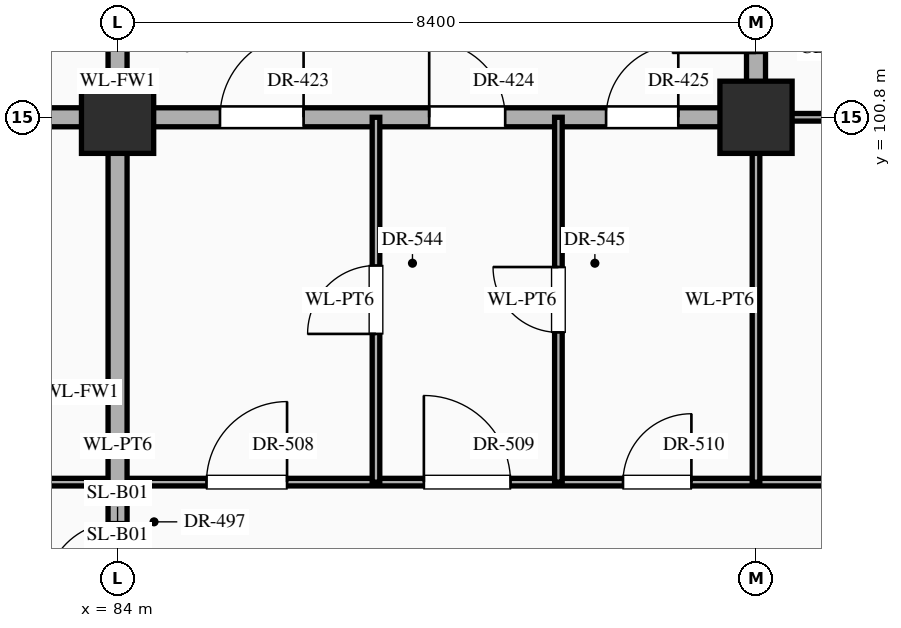
"""IFC4 building model, lengths in metres.
Left out: names, types, materials, properties, quantities, classifications, styles, units other than length and angle.
Written with IfcOpenShell. Run it as: python <this file> out.ifc"""

import sys

from ifc_helpers import new_model, si_unit, direction, frame, frame_2d, origin, origin_2d, place, context, subcontext, project, spatial, rectangle, extrude, element, fill, save


model = new_model("IFC4")
c1 = context("Model", 3, precision=1e-05, world=origin(), true_north=direction((0.0, 1.0)))
c2 = subcontext(c1, "Body", "Model", "MODEL_VIEW")
j1 = project(units=[si_unit("LENGTHUNIT", "METRE"), si_unit("PLANEANGLEUNIT", "RADIAN")], contexts=[c1])
p1 = place(None, origin())
s1 = spatial("IfcSite", under=j1, at=p1, CompositionType="ELEMENT")
p2 = place(p1, origin())
s2 = spatial("IfcBuilding", under=s1, at=p2, CompositionType="ELEMENT")
p3 = place(p2, frame((0.0, 0.0, -5.4)))
s3 = spatial("IfcBuildingStorey", under=s2, at=p3, CompositionType="ELEMENT", Elevation=-5.4)
for number, where, z_axis, x_axis in (
    (1, (84.0, 100.8, 0.0), (0.0, 0.0, 1.0), (1.0, 0.0, 0.0)),
    (2, (92.4, 100.8, 0.0), (0.0, 0.0, 1.0), (1.0, 0.0, 0.0)),
):
    element("IfcColumn", number, at=place(p3, frame(where, z_axis=z_axis, x_axis=x_axis)), inside=s3, PredefinedType="COLUMN", context=c2, shape_type="SweptSolid", body=[
        extrude(rectangle(XDim=0.95, YDim=0.95, at=origin_2d()), origin(), (0.0, 0.0, 1.0), 5.4),
    ])
p4 = place(p3, frame((16.8, 96.0, 0.0), z_axis=(0.0, 0.0, 1.0), x_axis=(1.0, 0.0, 0.0)))
e3 = element("IfcWall", 3, at=p4, inside=s3, PredefinedType="STANDARD", context=c2, shape_type="SweptSolid", body=[
    extrude(rectangle(XDim=134.4, YDim=0.1, at=frame_2d((67.2, 0.0))), origin(), (0.0, 0.0, 1.0), 5.1),
])
p5 = place(p4, frame((3.56, 0.0, 0.0)))
e4 = element("IfcOpeningElement", 4, at=p5, cuts=e3, PredefinedType="OPENING", context=c2, shape_type="SweptSolid", body=[
    extrude(rectangle(XDim=1.28, YDim=2.35, at=frame_2d((0.64, 1.175))), frame((0.0, 0.062, 0.0), z_axis=(0.0, -1.0, 0.0), x_axis=(1.0, 0.0, 0.0)), (0.0, 0.0, 1.0), 0.124),
])
p6 = place(p4, frame((9.63, 0.0, 0.0)))
e5 = element("IfcOpeningElement", 5, at=p6, cuts=e3, PredefinedType="OPENING", context=c2, shape_type="SweptSolid", body=[
    extrude(rectangle(XDim=0.94, YDim=2.3, at=frame_2d((0.47, 1.15))), frame((0.0, 0.062, 0.0), z_axis=(0.0, -1.0, 0.0), x_axis=(1.0, 0.0, 0.0)), (0.0, 0.0, 1.0), 0.124),
])
p7 = place(p4, frame((12.51, 0.0, 0.0)))
e6 = element("IfcOpeningElement", 6, at=p7, cuts=e3, PredefinedType="OPENING", context=c2, shape_type="SweptSolid", body=[
    extrude(rectangle(XDim=0.98, YDim=2.35, at=frame_2d((0.49, 1.175))), frame((0.0, 0.062, 0.0), z_axis=(0.0, -1.0, 0.0), x_axis=(1.0, 0.0, 0.0)), (0.0, 0.0, 1.0), 0.124),
])
p8 = place(p4, frame((14.99, 0.0, 0.0)))
e7 = element("IfcOpeningElement", 7, at=p8, cuts=e3, PredefinedType="OPENING", context=c2, shape_type="SweptSolid", body=[
    extrude(rectangle(XDim=1.02, YDim=2.4, at=frame_2d((0.51, 1.2))), frame((0.0, 0.062, 0.0), z_axis=(0.0, -1.0, 0.0), x_axis=(1.0, 0.0, 0.0)), (0.0, 0.0, 1.0), 0.124),
])
p9 = place(p4, frame((20.47, 0.0, 0.0)))
e8 = element("IfcOpeningElement", 8, at=p9, cuts=e3, PredefinedType="OPENING", context=c2, shape_type="SweptSolid", body=[
    extrude(rectangle(XDim=1.06, YDim=2.4, at=frame_2d((0.53, 1.2))), frame((0.0, 0.062, 0.0), z_axis=(0.0, -1.0, 0.0), x_axis=(1.0, 0.0, 0.0)), (0.0, 0.0, 1.0), 0.124),
])
p10 = place(p4, frame((28.83, 0.0, 0.0)))
e9 = element("IfcOpeningElement", 9, at=p10, cuts=e3, PredefinedType="OPENING", context=c2, shape_type="SweptSolid", body=[
    extrude(rectangle(XDim=1.14, YDim=2.4, at=frame_2d((0.57, 1.2))), frame((0.0, 0.062, 0.0), z_axis=(0.0, -1.0, 0.0), x_axis=(1.0, 0.0, 0.0)), (0.0, 0.0, 1.0), 0.124),
])
p11 = place(p4, frame((34.78, 0.0, 0.0)))
e10 = element("IfcOpeningElement", 10, at=p11, cuts=e3, PredefinedType="OPENING", context=c2, shape_type="SweptSolid", body=[
    extrude(rectangle(XDim=1.04, YDim=2.2, at=frame_2d((0.52, 1.1))), frame((0.0, 0.062, 0.0), z_axis=(0.0, -1.0, 0.0), x_axis=(1.0, 0.0, 0.0)), (0.0, 0.0, 1.0), 0.124),
])
p12 = place(p4, frame((37.66, 0.0, 0.0)))
e11 = element("IfcOpeningElement", 11, at=p12, cuts=e3, PredefinedType="OPENING", context=c2, shape_type="SweptSolid", body=[
    extrude(rectangle(XDim=1.08, YDim=2.25, at=frame_2d((0.54, 1.125))), frame((0.0, 0.062, 0.0), z_axis=(0.0, -1.0, 0.0), x_axis=(1.0, 0.0, 0.0)), (0.0, 0.0, 1.0), 0.124),
])
p13 = place(p4, frame((40.14, 0.0, 0.0)))
e12 = element("IfcOpeningElement", 12, at=p13, cuts=e3, PredefinedType="OPENING", context=c2, shape_type="SweptSolid", body=[
    extrude(rectangle(XDim=1.12, YDim=2.25, at=frame_2d((0.56, 1.125))), frame((0.0, 0.062, 0.0), z_axis=(0.0, -1.0, 0.0), x_axis=(1.0, 0.0, 0.0)), (0.0, 0.0, 1.0), 0.124),
])
p14 = place(p4, frame((45.62, 0.0, 0.0)))
e13 = element("IfcOpeningElement", 13, at=p14, cuts=e3, PredefinedType="OPENING", context=c2, shape_type="SweptSolid", body=[
    extrude(rectangle(XDim=1.16, YDim=2.3, at=frame_2d((0.58, 1.15))), frame((0.0, 0.062, 0.0), z_axis=(0.0, -1.0, 0.0), x_axis=(1.0, 0.0, 0.0)), (0.0, 0.0, 1.0), 0.124),
])
p15 = place(p4, frame((54.0, 0.0, 0.0)))
e14 = element("IfcOpeningElement", 14, at=p15, cuts=e3, PredefinedType="OPENING", context=c2, shape_type="SweptSolid", body=[
    extrude(rectangle(XDim=1.2, YDim=2.35, at=frame_2d((0.6, 1.175))), frame((0.0, 0.062, 0.0), z_axis=(0.0, -1.0, 0.0), x_axis=(1.0, 0.0, 0.0)), (0.0, 0.0, 1.0), 0.124),
])
p16 = place(p4, frame((62.38, 0.0, 0.0)))
e15 = element("IfcOpeningElement", 15, at=p16, cuts=e3, PredefinedType="OPENING", context=c2, shape_type="SweptSolid", body=[
    extrude(rectangle(XDim=1.24, YDim=2.3, at=frame_2d((0.62, 1.15))), frame((0.0, 0.062, 0.0), z_axis=(0.0, -1.0, 0.0), x_axis=(1.0, 0.0, 0.0)), (0.0, 0.0, 1.0), 0.124),
])
p17 = place(p4, frame((68.37, 0.0, 0.0)))
e16 = element("IfcOpeningElement", 16, at=p17, cuts=e3, PredefinedType="OPENING", context=c2, shape_type="SweptSolid", body=[
    extrude(rectangle(XDim=1.06, YDim=2.4, at=frame_2d((0.53, 1.2))), frame((0.0, 0.062, 0.0), z_axis=(0.0, -1.0, 0.0), x_axis=(1.0, 0.0, 0.0)), (0.0, 0.0, 1.0), 0.124),
])
p18 = place(p4, frame((71.23, 0.0, 0.0)))
e17 = element("IfcOpeningElement", 17, at=p18, cuts=e3, PredefinedType="OPENING", context=c2, shape_type="SweptSolid", body=[
    extrude(rectangle(XDim=1.14, YDim=2.4, at=frame_2d((0.57, 1.2))), frame((0.0, 0.062, 0.0), z_axis=(0.0, -1.0, 0.0), x_axis=(1.0, 0.0, 0.0)), (0.0, 0.0, 1.0), 0.124),
])
p19 = place(p4, frame((73.85, 0.0, 0.0)))
e18 = element("IfcOpeningElement", 18, at=p19, cuts=e3, PredefinedType="OPENING", context=c2, shape_type="SweptSolid", body=[
    extrude(rectangle(XDim=0.9, YDim=2.15, at=frame_2d((0.45, 1.075))), frame((0.0, 0.062, 0.0), z_axis=(0.0, -1.0, 0.0), x_axis=(1.0, 0.0, 0.0)), (0.0, 0.0, 1.0), 0.124),
])
p20 = place(p4, frame((79.37, 0.0, 0.0)))
e19 = element("IfcOpeningElement", 19, at=p20, cuts=e3, PredefinedType="OPENING", context=c2, shape_type="SweptSolid", body=[
    extrude(rectangle(XDim=0.86, YDim=2.1, at=frame_2d((0.43, 1.05))), frame((0.0, 0.062, 0.0), z_axis=(0.0, -1.0, 0.0), x_axis=(1.0, 0.0, 0.0)), (0.0, 0.0, 1.0), 0.124),
])
p21 = place(p4, frame((87.74, 0.0, 0.0)))
e20 = element("IfcOpeningElement", 20, at=p21, cuts=e3, PredefinedType="OPENING", context=c2, shape_type="SweptSolid", body=[
    extrude(rectangle(XDim=0.92, YDim=2.15, at=frame_2d((0.46, 1.075))), frame((0.0, 0.062, 0.0), z_axis=(0.0, -1.0, 0.0), x_axis=(1.0, 0.0, 0.0)), (0.0, 0.0, 1.0), 0.124),
])
p22 = place(p4, frame((93.62, 0.0, 0.0)))
e21 = element("IfcOpeningElement", 21, at=p22, cuts=e3, PredefinedType="OPENING", context=c2, shape_type="SweptSolid", body=[
    extrude(rectangle(XDim=0.96, YDim=2.2, at=frame_2d((0.48, 1.1))), frame((0.0, 0.062, 0.0), z_axis=(0.0, -1.0, 0.0), x_axis=(1.0, 0.0, 0.0)), (0.0, 0.0, 1.0), 0.124),
])
p23 = place(p4, frame((96.5, 0.0, 0.0)))
e22 = element("IfcOpeningElement", 22, at=p23, cuts=e3, PredefinedType="OPENING", context=c2, shape_type="SweptSolid", body=[
    extrude(rectangle(XDim=1.0, YDim=2.25, at=frame_2d((0.5, 1.125))), frame((0.0, 0.062, 0.0), z_axis=(0.0, -1.0, 0.0), x_axis=(1.0, 0.0, 0.0)), (0.0, 0.0, 1.0), 0.124),
])
p24 = place(p4, frame((98.98, 0.0, 0.0)))
e23 = element("IfcOpeningElement", 23, at=p24, cuts=e3, PredefinedType="OPENING", context=c2, shape_type="SweptSolid", body=[
    extrude(rectangle(XDim=1.04, YDim=2.2, at=frame_2d((0.52, 1.1))), frame((0.0, 0.062, 0.0), z_axis=(0.0, -1.0, 0.0), x_axis=(1.0, 0.0, 0.0)), (0.0, 0.0, 1.0), 0.124),
])
p25 = place(p4, frame((104.53, 0.0, 0.0)))
e24 = element("IfcOpeningElement", 24, at=p25, cuts=e3, PredefinedType="OPENING", context=c2, shape_type="SweptSolid", body=[
    extrude(rectangle(XDim=0.94, YDim=2.3, at=frame_2d((0.47, 1.15))), frame((0.0, 0.062, 0.0), z_axis=(0.0, -1.0, 0.0), x_axis=(1.0, 0.0, 0.0)), (0.0, 0.0, 1.0), 0.124),
])
p26 = place(p4, frame((112.91, 0.0, 0.0)))
e25 = element("IfcOpeningElement", 25, at=p26, cuts=e3, PredefinedType="OPENING", context=c2, shape_type="SweptSolid", body=[
    extrude(rectangle(XDim=0.98, YDim=2.35, at=frame_2d((0.49, 1.175))), frame((0.0, 0.062, 0.0), z_axis=(0.0, -1.0, 0.0), x_axis=(1.0, 0.0, 0.0)), (0.0, 0.0, 1.0), 0.124),
])
p27 = place(p4, frame((118.79, 0.0, 0.0)))
e26 = element("IfcOpeningElement", 26, at=p27, cuts=e3, PredefinedType="OPENING", context=c2, shape_type="SweptSolid", body=[
    extrude(rectangle(XDim=1.02, YDim=2.4, at=frame_2d((0.51, 1.2))), frame((0.0, 0.062, 0.0), z_axis=(0.0, -1.0, 0.0), x_axis=(1.0, 0.0, 0.0)), (0.0, 0.0, 1.0), 0.124),
])
p28 = place(p4, frame((121.67, 0.0, 0.0)))
e27 = element("IfcOpeningElement", 27, at=p28, cuts=e3, PredefinedType="OPENING", context=c2, shape_type="SweptSolid", body=[
    extrude(rectangle(XDim=1.06, YDim=2.4, at=frame_2d((0.53, 1.2))), frame((0.0, 0.062, 0.0), z_axis=(0.0, -1.0, 0.0), x_axis=(1.0, 0.0, 0.0)), (0.0, 0.0, 1.0), 0.124),
])
p29 = place(p4, frame((124.13, 0.0, 0.0)))
e28 = element("IfcOpeningElement", 28, at=p29, cuts=e3, PredefinedType="OPENING", context=c2, shape_type="SweptSolid", body=[
    extrude(rectangle(XDim=1.14, YDim=2.4, at=frame_2d((0.57, 1.2))), frame((0.0, 0.062, 0.0), z_axis=(0.0, -1.0, 0.0), x_axis=(1.0, 0.0, 0.0)), (0.0, 0.0, 1.0), 0.124),
])
p30 = place(p4, frame((129.75, 0.0, 0.0)))
e29 = element("IfcOpeningElement", 29, at=p30, cuts=e3, PredefinedType="OPENING", context=c2, shape_type="SweptSolid", body=[
    extrude(rectangle(XDim=0.9, YDim=2.15, at=frame_2d((0.45, 1.075))), frame((0.0, 0.062, 0.0), z_axis=(0.0, -1.0, 0.0), x_axis=(1.0, 0.0, 0.0)), (0.0, 0.0, 1.0), 0.124),
])
p31 = place(p3, frame((75.6, 100.8, 0.0), z_axis=(0.0, 0.0, 1.0), x_axis=(1.0, 0.0, 0.0)))
e30 = element("IfcWall", 30, at=p31, inside=s3, PredefinedType="STANDARD", context=c2, shape_type="SweptSolid", body=[
    extrude(rectangle(XDim=16.8, YDim=0.25, at=frame_2d((8.4, 0.0))), origin(), (0.0, 0.0, 1.0), 4.25),
])
p32 = place(p31, frame((3.7, 0.0, 0.0)))
e31 = element("IfcOpeningElement", 31, at=p32, cuts=e30, PredefinedType="OPENING", context=c2, shape_type="SweptSolid", body=[
    extrude(rectangle(XDim=1.0, YDim=2.2, at=frame_2d((0.5, 1.1))), frame((0.0, 0.137, 0.0), z_axis=(0.0, -1.0, 0.0), x_axis=(1.0, 0.0, 0.0)), (0.0, 0.0, 1.0), 0.274),
])
p33 = place(p31, frame((9.748, 0.0, 0.0)))
e32 = element("IfcOpeningElement", 32, at=p33, cuts=e30, PredefinedType="OPENING", context=c2, shape_type="SweptSolid", body=[
    extrude(rectangle(XDim=1.1, YDim=2.2, at=frame_2d((0.55, 1.1))), frame((0.0, 0.137, 0.0), z_axis=(0.0, -1.0, 0.0), x_axis=(1.0, 0.0, 0.0)), (0.0, 0.0, 1.0), 0.274),
])
p34 = place(p31, frame((12.5, 0.0, 0.0)))
e33 = element("IfcOpeningElement", 33, at=p34, cuts=e30, PredefinedType="OPENING", context=c2, shape_type="SweptSolid", body=[
    extrude(rectangle(XDim=1.0, YDim=2.2, at=frame_2d((0.5, 1.1))), frame((0.0, 0.137, 0.0), z_axis=(0.0, -1.0, 0.0), x_axis=(1.0, 0.0, 0.0)), (0.0, 0.0, 1.0), 0.274),
])
p35 = place(p31, frame((14.827, 0.0, 0.0)))
e34 = element("IfcOpeningElement", 34, at=p35, cuts=e30, PredefinedType="OPENING", context=c2, shape_type="SweptSolid", body=[
    extrude(rectangle(XDim=0.95, YDim=2.15, at=frame_2d((0.475, 1.075))), frame((0.0, 0.137, 0.0), z_axis=(0.0, -1.0, 0.0), x_axis=(1.0, 0.0, 0.0)), (0.0, 0.0, 1.0), 0.274),
])
p36 = place(p3, frame((92.4, 100.8, 0.0), z_axis=(0.0, 0.0, 1.0), x_axis=(1.0, 0.0, 0.0)))
e35 = element("IfcWall", 35, at=p36, inside=s3, PredefinedType="STANDARD", context=c2, shape_type="SweptSolid", body=[
    extrude(rectangle(XDim=4.2, YDim=0.1, at=frame_2d((2.1, 0.0))), origin(), (0.0, 0.0, 1.0), 4.25),
])
p37 = place(p36, frame((1.768, 0.0, 0.0)))
e36 = element("IfcOpeningElement", 36, at=p37, cuts=e35, PredefinedType="OPENING", context=c2, shape_type="SweptSolid", body=[
    extrude(rectangle(XDim=1.06, YDim=2.4, at=frame_2d((0.53, 1.2))), frame((0.0, 0.062, 0.0), z_axis=(0.0, -1.0, 0.0), x_axis=(1.0, 0.0, 0.0)), (0.0, 0.0, 1.0), 0.124),
])
p38 = place(p3, frame((84.0, 79.2, 0.0), z_axis=(0.0, 0.0, 1.0), x_axis=(0.0, 1.0, 0.0)))
e37 = element("IfcWall", 37, at=p38, inside=s3, PredefinedType="STANDARD", context=c2, shape_type="SweptSolid", body=[
    extrude(rectangle(XDim=35.96, YDim=0.25, at=frame_2d((17.98, 0.0))), origin(), (0.0, 0.0, 1.0), 4.35),
])
p39 = place(p38, frame((22.798, 0.0, 0.0)))
e38 = element("IfcOpeningElement", 38, at=p39, cuts=e37, PredefinedType="OPENING", context=c2, shape_type="SweptSolid", body=[
    extrude(rectangle(XDim=1.6, YDim=2.3, at=frame_2d((0.8, 1.15))), frame((0.0, 0.137, 0.0), z_axis=(0.0, -1.0, 0.0), x_axis=(1.0, 0.0, 0.0)), (0.0, 0.0, 1.0), 0.274),
])
p40 = place(p38, frame((12.528, 0.0, 0.0)))
e39 = element("IfcOpeningElement", 39, at=p40, cuts=e37, PredefinedType="OPENING", context=c2, shape_type="SweptSolid", body=[
    extrude(rectangle(XDim=0.95, YDim=2.15, at=frame_2d((0.475, 1.075))), frame((0.0, 0.137, 0.0), z_axis=(0.0, -1.0, 0.0), x_axis=(1.0, 0.0, 0.0)), (0.0, 0.0, 1.0), 0.274),
])
p41 = place(p38, frame((15.323, 0.0, 0.0)))
e40 = element("IfcOpeningElement", 40, at=p41, cuts=e37, PredefinedType="OPENING", context=c2, shape_type="SweptSolid", body=[
    extrude(rectangle(XDim=0.95, YDim=2.15, at=frame_2d((0.475, 1.075))), frame((0.0, 0.137, 0.0), z_axis=(0.0, -1.0, 0.0), x_axis=(1.0, 0.0, 0.0)), (0.0, 0.0, 1.0), 0.274),
])
p42 = place(p38, frame((25.903, 0.0, 0.0)))
e41 = element("IfcOpeningElement", 41, at=p42, cuts=e37, PredefinedType="OPENING", context=c2, shape_type="SweptSolid", body=[
    extrude(rectangle(XDim=1.8, YDim=2.35, at=frame_2d((0.9, 1.175))), frame((0.0, 0.137, 0.0), z_axis=(0.0, -1.0, 0.0), x_axis=(1.0, 0.0, 0.0)), (0.0, 0.0, 1.0), 0.274),
])
p43 = place(p38, frame((29.722, 0.0, 0.0)))
e42 = element("IfcOpeningElement", 42, at=p43, cuts=e37, PredefinedType="OPENING", context=c2, shape_type="SweptSolid", body=[
    extrude(rectangle(XDim=0.95, YDim=2.15, at=frame_2d((0.475, 1.075))), frame((0.0, 0.137, 0.0), z_axis=(0.0, -1.0, 0.0), x_axis=(1.0, 0.0, 0.0)), (0.0, 0.0, 1.0), 0.274),
])
p44 = place(p38, frame((5.327, 0.0, 0.0)))
e43 = element("IfcOpeningElement", 43, at=p44, cuts=e37, PredefinedType="OPENING", context=c2, shape_type="SweptSolid", body=[
    extrude(rectangle(XDim=0.95, YDim=2.15, at=frame_2d((0.475, 1.075))), frame((0.0, 0.137, 0.0), z_axis=(0.0, -1.0, 0.0), x_axis=(1.0, 0.0, 0.0)), (0.0, 0.0, 1.0), 0.274),
])
p45 = place(p3, frame((87.4, 96.0, 0.0), z_axis=(0.0, 0.0, 1.0), x_axis=(0.0, 1.0, 0.0)))
e44 = element("IfcWall", 44, at=p45, inside=s3, PredefinedType="STANDARD", context=c2, shape_type="SweptSolid", body=[
    extrude(rectangle(XDim=4.8, YDim=0.1, at=frame_2d((2.4, 0.0))), origin(), (0.0, 0.0, 1.0), 5.1),
])
p46 = place(p45, frame((1.95, 0.0, 0.0)))
e45 = element("IfcOpeningElement", 45, at=p46, cuts=e44, PredefinedType="OPENING", context=c2, shape_type="SweptSolid", body=[
    extrude(rectangle(XDim=0.9, YDim=2.15, at=frame_2d((0.45, 1.075))), frame((0.0, 0.062, 0.0), z_axis=(0.0, -1.0, 0.0), x_axis=(1.0, 0.0, 0.0)), (0.0, 0.0, 1.0), 0.124),
])
p47 = place(p3, frame((89.8, 96.0, 0.0), z_axis=(0.0, 0.0, 1.0), x_axis=(0.0, 1.0, 0.0)))
e46 = element("IfcWall", 46, at=p47, inside=s3, PredefinedType="STANDARD", context=c2, shape_type="SweptSolid", body=[
    extrude(rectangle(XDim=4.8, YDim=0.1, at=frame_2d((2.4, 0.0))), origin(), (0.0, 0.0, 1.0), 5.1),
])
p48 = place(p47, frame((1.97, 0.0, 0.0)))
e47 = element("IfcOpeningElement", 47, at=p48, cuts=e46, PredefinedType="OPENING", context=c2, shape_type="SweptSolid", body=[
    extrude(rectangle(XDim=0.86, YDim=2.1, at=frame_2d((0.43, 1.05))), frame((0.0, 0.062, 0.0), z_axis=(0.0, -1.0, 0.0), x_axis=(1.0, 0.0, 0.0)), (0.0, 0.0, 1.0), 0.124),
])
p49 = place(p3, frame((92.4, 96.0, 0.0), z_axis=(0.0, 0.0, 1.0), x_axis=(0.0, 1.0, 0.0)))
e48 = element("IfcWall", 48, at=p49, inside=s3, PredefinedType="STANDARD", context=c2, shape_type="SweptSolid", body=[
    extrude(rectangle(XDim=4.8, YDim=0.1, at=frame_2d((2.4, 0.0))), origin(), (0.0, 0.0, 1.0), 4.35),
])
p50 = place(p3, frame((92.4, 100.8, 0.0), z_axis=(0.0, 0.0, 1.0), x_axis=(0.0, 1.0, 0.0)))
e49 = element("IfcWall", 49, at=p50, inside=s3, PredefinedType="STANDARD", context=c2, shape_type="SweptSolid", body=[
    extrude(rectangle(XDim=3.6, YDim=0.25, at=frame_2d((1.8, 0.0))), origin(), (0.0, 0.0, 1.0), 4.35),
])
p51 = place(p50, frame((0.847, 0.0, 0.0)))
e50 = element("IfcOpeningElement", 50, at=p51, cuts=e49, PredefinedType="OPENING", context=c2, shape_type="SweptSolid", body=[
    extrude(rectangle(XDim=1.1, YDim=2.2, at=frame_2d((0.55, 1.1))), frame((0.0, 0.137, 0.0), z_axis=(0.0, -1.0, 0.0), x_axis=(1.0, 0.0, 0.0)), (0.0, 0.0, 1.0), 0.274),
])
p52 = place(p51, origin())
e51 = element("IfcDoor", 51, at=p52, inside=s3, OperationType="SINGLE_SWING_LEFT", PredefinedType="DOOR", context=c2, shape_type="SweptSolid", body=[
    extrude(rectangle(XDim=1.1, YDim=2.2, at=frame_2d((0.55, 1.1))), frame((0.0, 0.025, 0.0), z_axis=(0.0, -1.0, 0.0), x_axis=(1.0, 0.0, 0.0)), (0.0, 0.0, 1.0), 0.05),
])
fill(e50, e51)
p53 = place(p33, origin())
e52 = element("IfcDoor", 52, at=p53, inside=s3, OperationType="SINGLE_SWING_RIGHT", PredefinedType="DOOR", context=c2, shape_type="SweptSolid", body=[
    extrude(rectangle(XDim=1.1, YDim=2.2, at=frame_2d((0.55, 1.1))), frame((0.0, 0.025, 0.0), z_axis=(0.0, -1.0, 0.0), x_axis=(1.0, 0.0, 0.0)), (0.0, 0.0, 1.0), 0.05),
])
fill(e32, e52)
p54 = place(p34, origin())
e53 = element("IfcDoor", 53, at=p54, inside=s3, OperationType="SINGLE_SWING_LEFT", PredefinedType="DOOR", context=c2, shape_type="SweptSolid", body=[
    extrude(rectangle(XDim=1.0, YDim=2.2, at=frame_2d((0.5, 1.1))), frame((0.0, 0.025, 0.0), z_axis=(0.0, -1.0, 0.0), x_axis=(1.0, 0.0, 0.0)), (0.0, 0.0, 1.0), 0.05),
])
fill(e33, e53)
p55 = place(p35, origin())
e54 = element("IfcDoor", 54, at=p55, inside=s3, OperationType="SINGLE_SWING_RIGHT", PredefinedType="DOOR", context=c2, shape_type="SweptSolid", body=[
    extrude(rectangle(XDim=0.95, YDim=2.15, at=frame_2d((0.475, 1.075))), frame((0.0, 0.025, 0.0), z_axis=(0.0, -1.0, 0.0), x_axis=(1.0, 0.0, 0.0)), (0.0, 0.0, 1.0), 0.05),
])
fill(e34, e54)
p56 = place(p41, origin())
e55 = element("IfcDoor", 55, at=p56, inside=s3, OperationType="SINGLE_SWING_LEFT", PredefinedType="DOOR", context=c2, shape_type="SweptSolid", body=[
    extrude(rectangle(XDim=0.95, YDim=2.15, at=frame_2d((0.475, 1.075))), frame((0.0, 0.025, 0.0), z_axis=(0.0, -1.0, 0.0), x_axis=(1.0, 0.0, 0.0)), (0.0, 0.0, 1.0), 0.05),
])
fill(e40, e55)
p57 = place(p17, origin())
e56 = element("IfcDoor", 56, at=p57, inside=s3, OperationType="SINGLE_SWING_RIGHT", PredefinedType="DOOR", context=c2, shape_type="SweptSolid", body=[
    extrude(rectangle(XDim=1.06, YDim=2.4, at=frame_2d((0.53, 1.2))), frame((0.0, 0.025, 0.0), z_axis=(0.0, -1.0, 0.0), x_axis=(1.0, 0.0, 0.0)), (0.0, 0.0, 1.0), 0.05),
])
fill(e16, e56)
p58 = place(p18, origin())
e57 = element("IfcDoor", 57, at=p58, inside=s3, OperationType="SINGLE_SWING_LEFT", PredefinedType="DOOR", context=c2, shape_type="SweptSolid", body=[
    extrude(rectangle(XDim=1.14, YDim=2.4, at=frame_2d((0.57, 1.2))), frame((0.0, 0.025, 0.0), z_axis=(0.0, -1.0, 0.0), x_axis=(1.0, 0.0, 0.0)), (0.0, 0.0, 1.0), 0.05),
])
fill(e17, e57)
p59 = place(p19, origin())
e58 = element("IfcDoor", 58, at=p59, inside=s3, OperationType="SINGLE_SWING_RIGHT", PredefinedType="DOOR", context=c2, shape_type="SweptSolid", body=[
    extrude(rectangle(XDim=0.9, YDim=2.15, at=frame_2d((0.45, 1.075))), frame((0.0, 0.025, 0.0), z_axis=(0.0, -1.0, 0.0), x_axis=(1.0, 0.0, 0.0)), (0.0, 0.0, 1.0), 0.05),
])
fill(e18, e58)
p60 = place(p46, origin())
e59 = element("IfcDoor", 59, at=p60, inside=s3, OperationType="SINGLE_SWING_LEFT", PredefinedType="DOOR", context=c2, shape_type="SweptSolid", body=[
    extrude(rectangle(XDim=0.9, YDim=2.15, at=frame_2d((0.45, 1.075))), frame((0.0, 0.025, 0.0), z_axis=(0.0, -1.0, 0.0), x_axis=(1.0, 0.0, 0.0)), (0.0, 0.0, 1.0), 0.05),
])
fill(e45, e59)
p61 = place(p48, origin())
e60 = element("IfcDoor", 60, at=p61, inside=s3, OperationType="SINGLE_SWING_RIGHT", PredefinedType="DOOR", context=c2, shape_type="SweptSolid", body=[
    extrude(rectangle(XDim=0.86, YDim=2.1, at=frame_2d((0.43, 1.05))), frame((0.0, 0.025, 0.0), z_axis=(0.0, -1.0, 0.0), x_axis=(1.0, 0.0, 0.0)), (0.0, 0.0, 1.0), 0.05),
])
fill(e47, e60)
save(model, sys.argv[1])
